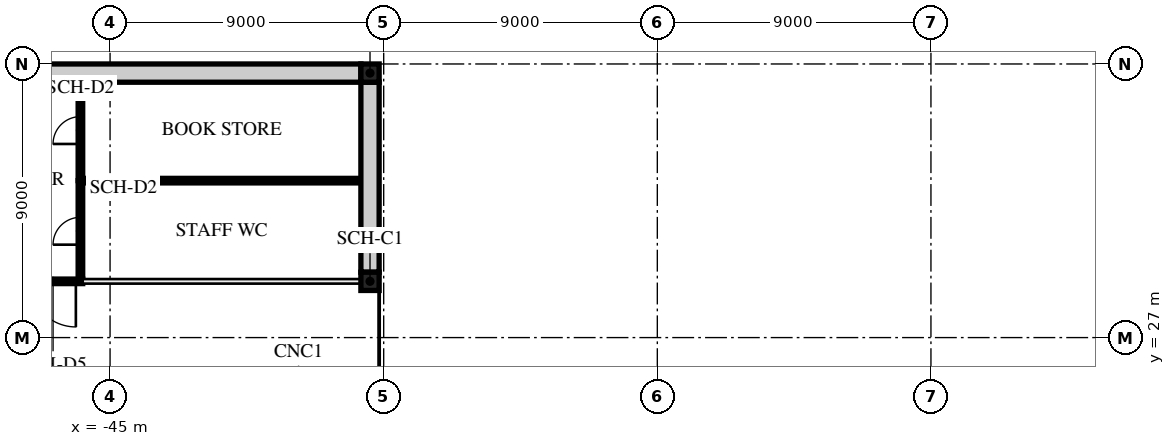
"""IFC4 building model, lengths in metres.
Left out: names, types, materials, properties, quantities, classifications, styles, units other than length and angle.
Written with IfcOpenShell. Run it as: python <this file> out.ifc"""

import sys

from ifc_helpers import new_model, si_unit, direction, frame, frame_2d, origin, origin_2d, place, context, subcontext, project, spatial, rectangle, extrude, element, fill, save


model = new_model("IFC4")
c1 = context("Model", 3, precision=1e-05, world=origin(), true_north=direction((0.0, 1.0)))
c2 = subcontext(c1, "Body", "Model", "MODEL_VIEW")
j1 = project(units=[si_unit("LENGTHUNIT", "METRE"), si_unit("PLANEANGLEUNIT", "RADIAN")], contexts=[c1])
p1 = place(None, origin())
s1 = spatial("IfcSite", under=j1, at=p1, CompositionType="ELEMENT")
p2 = place(p1, origin())
s2 = spatial("IfcBuilding", under=s1, at=p2, CompositionType="ELEMENT")
p3 = place(p2, origin())
s3 = spatial("IfcBuildingStorey", under=s2, at=p3, CompositionType="ELEMENT", Elevation=0.0)
p4 = place(p3, frame((-34.6, 27.0, 0.0), z_axis=(0.0, 0.0, 1.0), x_axis=(1.0, 0.0, 0.0)))
e1 = element("IfcColumn", 1, at=p4, inside=s3, PredefinedType="COLUMN", context=c2, shape_type="SweptSolid", body=[
    extrude(rectangle(XDim=0.7, YDim=0.7, at=origin_2d()), origin(), (0.0, 0.0, 1.0), 4.5),
])
p5 = place(p3, frame((-27.0, 27.0, 0.0), z_axis=(0.0, 0.0, 1.0), x_axis=(1.0, 0.0, 0.0)))
e2 = element("IfcColumn", 2, at=p5, inside=s3, PredefinedType="COLUMN", context=c2, shape_type="SweptSolid", body=[
    extrude(rectangle(XDim=0.875, YDim=0.875, at=origin_2d()), origin(), (0.0, 0.0, 1.0), 4.5),
])
p6 = place(p3, frame((-27.0, 34.6, 0.0), z_axis=(0.0, 0.0, 1.0), x_axis=(1.0, 0.0, 0.0)))
e3 = element("IfcColumn", 3, at=p6, inside=s3, PredefinedType="COLUMN", context=c2, shape_type="SweptSolid", body=[
    extrude(rectangle(XDim=0.55, YDim=0.55, at=origin_2d()), origin(), (0.0, 0.0, 1.0), 4.5),
])
p7 = place(p3, frame((-18.0, 34.6, 0.0), z_axis=(0.0, 0.0, 1.0), x_axis=(1.0, 0.0, 0.0)))
e4 = element("IfcColumn", 4, at=p7, inside=s3, PredefinedType="COLUMN", context=c2, shape_type="SweptSolid", body=[
    extrude(rectangle(XDim=0.625, YDim=0.625, at=origin_2d()), origin(), (0.0, 0.0, 1.0), 4.5),
])
p8 = place(p3, frame((-17.307, 25.412, 0.0), z_axis=(0.0, 0.0, 1.0), x_axis=(0.991001197216, 0.133853005627, 0.0)))
e5 = element("IfcColumn", 5, at=p8, inside=s3, PredefinedType="COLUMN", context=c2, shape_type="SweptSolid", body=[
    extrude(rectangle(XDim=1.575, YDim=1.575, at=origin_2d()), origin(), (0.0, 0.0, 1.0), 4.5),
])
p9 = place(p3, frame((-36.0, 27.0, 0.0), z_axis=(0.0, 0.0, 1.0), x_axis=(1.0, 0.0, 0.0)))
e6 = element("IfcWall", 6, at=p9, inside=s3, PredefinedType="PARTITIONING", context=c2, shape_type="SweptSolid", body=[
    extrude(rectangle(XDim=0.9, YDim=0.1, at=frame_2d((0.45, 0.0))), origin(), (0.0, 0.0, 1.0), 4.1),
])
p10 = place(p3, frame((-34.1, 27.0, 0.0), z_axis=(0.0, 0.0, 1.0), x_axis=(1.0, 0.0, 0.0)))
e7 = element("IfcWall", 7, at=p10, inside=s3, PredefinedType="PARTITIONING", context=c2, shape_type="SweptSolid", body=[
    extrude(rectangle(XDim=6.6, YDim=0.1, at=frame_2d((3.3, 0.0))), origin(), (0.0, 0.0, 1.0), 4.1),
])
p11 = place(p10, frame((1.7, 0.0, 0.0)))
e8 = element("IfcOpeningElement", 8, at=p11, cuts=e7, PredefinedType="OPENING", context=c2, shape_type="SweptSolid", body=[
    extrude(rectangle(XDim=1.8, YDim=2.1, at=frame_2d((0.9, 1.05))), frame((0.0, 0.06, 0.0), z_axis=(0.0, -1.0, 0.0), x_axis=(1.0, 0.0, 0.0)), (0.0, 0.0, 1.0), 0.12),
])
p12 = place(p3, frame((-18.075, 27.0, 0.0), z_axis=(0.0, 0.0, 1.0), x_axis=(1.0, 0.0, 0.0)))
e9 = element("IfcWall", 9, at=p12, inside=s3, PredefinedType="PARTITIONING", context=c2, shape_type="SweptSolid", body=[
    extrude(rectangle(XDim=4.625, YDim=0.1, at=frame_2d((2.312, 0.0))), origin(), (0.0, 0.0, 1.0), 4.1),
])
p13 = place(p3, frame((-27.075, 31.5, 0.0), z_axis=(0.0, 0.0, 1.0), x_axis=(1.0, 0.0, 0.0)))
e10 = element("IfcWall", 10, at=p13, inside=s3, PredefinedType="PARTITIONING", context=c2, shape_type="SweptSolid", body=[
    extrude(rectangle(XDim=9.15, YDim=0.2, at=frame_2d((4.575, 0.0))), origin(), (0.0, 0.0, 1.0), 4.1),
])
p14 = place(p13, frame((0.875, 0.0, 0.0)))
e11 = element("IfcOpeningElement", 11, at=p14, cuts=e10, PredefinedType="OPENING", context=c2, shape_type="SweptSolid", body=[
    extrude(rectangle(XDim=1.2, YDim=2.1, at=frame_2d((0.6, 1.05))), frame((0.0, 0.11, 0.0), z_axis=(0.0, -1.0, 0.0), x_axis=(1.0, 0.0, 0.0)), (0.0, 0.0, 1.0), 0.22),
])
p15 = place(p3, frame((-27.0, 27.5, 0.0), z_axis=(0.0, 0.0, 1.0), x_axis=(0.0, 1.0, 0.0)))
e12 = element("IfcWall", 12, at=p15, inside=s3, PredefinedType="PARTITIONING", context=c2, shape_type="SweptSolid", body=[
    extrude(rectangle(XDim=3.9, YDim=0.15, at=frame_2d((1.95, 0.0))), origin(), (0.0, 0.0, 1.0), 4.1),
])
p16 = place(p3, frame((-27.0, 31.6, 0.0), z_axis=(0.0, 0.0, 1.0), x_axis=(0.0, 1.0, 0.0)))
e13 = element("IfcWall", 13, at=p16, inside=s3, PredefinedType="PARTITIONING", context=c2, shape_type="SweptSolid", body=[
    extrude(rectangle(XDim=2.725, YDim=0.2, at=frame_2d((1.362, 0.0))), origin(), (0.0, 0.0, 1.0), 4.1),
])
p17 = place(p3, frame((-27.0, 34.875, 0.0), z_axis=(0.0, 0.0, 1.0), x_axis=(0.0, 1.0, 0.0)))
e14 = element("IfcWall", 14, at=p17, inside=s3, PredefinedType="PARTITIONING", context=c2, shape_type="SweptSolid", body=[
    extrude(rectangle(XDim=1.125, YDim=0.2, at=frame_2d((0.562, 0.0))), origin(), (0.0, 0.0, 1.0), 4.1),
])
p18 = place(p3, frame((-18.0, 27.05, 0.0), z_axis=(0.0, 0.0, 1.0), x_axis=(0.0, 1.0, 0.0)))
e15 = element("IfcWall", 15, at=p18, inside=s3, PredefinedType="PARTITIONING", context=c2, shape_type="SweptSolid", body=[
    extrude(rectangle(XDim=4.35, YDim=0.15, at=frame_2d((2.175, 0.0))), origin(), (0.0, 0.0, 1.0), 4.1),
])
p19 = place(p3, frame((-18.0, 31.6, 0.0), z_axis=(0.0, 0.0, 1.0), x_axis=(0.0, 1.0, 0.0)))
e16 = element("IfcWall", 16, at=p19, inside=s3, PredefinedType="PARTITIONING", context=c2, shape_type="SweptSolid", body=[
    extrude(rectangle(XDim=2.688, YDim=0.2, at=frame_2d((1.344, 0.0))), origin(), (0.0, 0.0, 1.0), 4.1),
])
p20 = place(p3, frame((-18.0, 34.913, 0.0), z_axis=(0.0, 0.0, 1.0), x_axis=(0.0, 1.0, 0.0)))
e17 = element("IfcWall", 17, at=p20, inside=s3, PredefinedType="PARTITIONING", context=c2, shape_type="SweptSolid", body=[
    extrude(rectangle(XDim=1.087, YDim=0.2, at=frame_2d((0.544, 0.0))), origin(), (0.0, 0.0, 1.0), 4.1),
])
p21 = place(p3, frame((-13.5, 27.05, 0.0), z_axis=(0.0, 0.0, 1.0), x_axis=(0.0, 1.0, 0.0)))
e18 = element("IfcWall", 18, at=p21, inside=s3, PredefinedType="PARTITIONING", context=c2, shape_type="SweptSolid", body=[
    extrude(rectangle(XDim=8.95, YDim=0.1, at=frame_2d((4.475, 0.0))), origin(), (0.0, 0.0, 1.0), 4.1),
])
p22 = place(p21, frame((3.55, 0.0, 0.0)))
e19 = element("IfcOpeningElement", 19, at=p22, cuts=e18, PredefinedType="OPENING", context=c2, shape_type="SweptSolid", body=[
    extrude(rectangle(XDim=1.8, YDim=2.1, at=frame_2d((0.9, 1.05))), frame((0.0, 0.06, 0.0), z_axis=(0.0, -1.0, 0.0), x_axis=(1.0, 0.0, 0.0)), (0.0, 0.0, 1.0), 0.12),
])
for number, where, z_axis, x_axis in (
    (20, (-36.45, 28.85, -0.2), (0.0, 0.0, 1.0), (1.0, 0.0, 0.0)),
    (21, (-36.45, 35.7, -0.2), (0.0, 0.0, 1.0), (1.0, 0.0, 0.0)),
):
    element("IfcColumn", number, at=place(p3, frame(where, z_axis=z_axis, x_axis=x_axis)), inside=s3, PredefinedType="COLUMN", context=c2, shape_type="SweptSolid", body=[
        extrude(rectangle(XDim=0.6, YDim=0.6, at=origin_2d()), origin(), (0.0, 0.0, 1.0), 4.7),
    ])
p23 = place(p3, frame((-45.9, 32.163, 0.0), z_axis=(0.0, 0.0, 1.0), x_axis=(1.0, 0.0, 0.0)))
e22 = element("IfcWall", 22, at=p23, inside=s3, PredefinedType="PARTITIONING", context=c2, shape_type="SweptSolid", body=[
    extrude(rectangle(XDim=9.15, YDim=0.15, at=frame_2d((4.575, 0.0))), origin(), (0.0, 0.0, 1.0), 4.1),
])
p24 = place(p3, frame((-45.975, 28.925, 0.0), z_axis=(0.0, 0.0, 1.0), x_axis=(0.0, 1.0, 0.0)))
e23 = element("IfcWall", 23, at=p24, inside=s3, PredefinedType="PARTITIONING", context=c2, shape_type="SweptSolid", body=[
    extrude(rectangle(XDim=3.238, YDim=0.15, at=frame_2d((1.619, 0.0))), origin(), (0.0, 0.0, 1.0), 4.1),
])
p25 = place(p24, frame((1.131, 0.0, 0.0)))
e24 = element("IfcOpeningElement", 24, at=p25, cuts=e23, PredefinedType="OPENING", context=c2, shape_type="SweptSolid", body=[
    extrude(rectangle(XDim=0.9, YDim=2.1, at=frame_2d((0.45, 1.05))), frame((0.0, 0.085, 0.0), z_axis=(0.0, -1.0, 0.0), x_axis=(1.0, 0.0, 0.0)), (0.0, 0.0, 1.0), 0.17),
])
p26 = place(p3, frame((-45.975, 32.163, 0.0), z_axis=(0.0, 0.0, 1.0), x_axis=(0.0, 1.0, 0.0)))
e25 = element("IfcWall", 25, at=p26, inside=s3, PredefinedType="PARTITIONING", context=c2, shape_type="SweptSolid", body=[
    extrude(rectangle(XDim=3.237, YDim=0.15, at=frame_2d((1.619, 0.0))), origin(), (0.0, 0.0, 1.0), 4.1),
])
p27 = place(p26, frame((1.206, 0.0, 0.0)))
e26 = element("IfcOpeningElement", 26, at=p27, cuts=e25, PredefinedType="OPENING", context=c2, shape_type="SweptSolid", body=[
    extrude(rectangle(XDim=0.9, YDim=2.1, at=frame_2d((0.45, 1.05))), frame((0.0, 0.085, 0.0), z_axis=(0.0, -1.0, 0.0), x_axis=(1.0, 0.0, 0.0)), (0.0, 0.0, 1.0), 0.17),
])
p28 = place(p3, frame((-47.85, 35.7, -0.2), z_axis=(0.0, 0.0, 1.0), x_axis=(1.0, 0.0, 0.0)))
e27 = element("IfcWall", 27, at=p28, inside=s3, PredefinedType="STANDARD", context=c2, shape_type="SweptSolid", body=[
    extrude(rectangle(XDim=11.1, YDim=0.6, at=frame_2d((5.55, 0.0))), origin(), (0.0, 0.0, 1.0), 4.3),
])
p29 = place(p3, frame((-36.45, 35.4, -0.2), z_axis=(0.0, 0.0, 1.0), x_axis=(0.0, -1.0, 0.0)))
e28 = element("IfcWall", 28, at=p29, inside=s3, PredefinedType="STANDARD", context=c2, shape_type="SweptSolid", body=[
    extrude(rectangle(XDim=6.25, YDim=0.6, at=frame_2d((3.125, 0.0))), origin(), (0.0, 0.0, 1.0), 4.3),
])
p30 = place(p3, frame((-45.9, 28.85, 0.0), z_axis=(0.0, 0.0, 1.0), x_axis=(-1.0, 0.0, 0.0)))
e29 = element("IfcWall", 29, at=p30, inside=s3, PredefinedType="PARTITIONING", context=c2, shape_type="SweptSolid", body=[
    extrude(rectangle(XDim=1.95, YDim=0.15, at=frame_2d((0.975, 0.0))), origin(), (0.0, 0.0, 1.0), 4.1),
])
p31 = place(p30, frame((0.225, 0.0, 0.0)))
e30 = element("IfcOpeningElement", 30, at=p31, cuts=e29, PredefinedType="OPENING", context=c2, shape_type="SweptSolid", body=[
    extrude(rectangle(XDim=1.5, YDim=2.4, at=frame_2d((0.75, 1.2))), frame((0.0, 0.085, 0.0), z_axis=(0.0, -1.0, 0.0), x_axis=(1.0, 0.0, 0.0)), (0.0, 0.0, 1.0), 0.17),
])
p32 = place(p3, frame((24.5, 35.7, 0.0), z_axis=(0.0, 0.0, 1.0), x_axis=(-1.0, 0.0, 0.0)))
e31 = element("IfcWall", 31, at=p32, inside=s3, PredefinedType="STANDARD", context=c2, shape_type="SweptSolid", body=[
    extrude(rectangle(XDim=49.0, YDim=0.6, at=frame_2d((24.5, 0.0))), origin(), (0.0, 0.0, 1.0), 4.1),
])
p33 = place(p32, frame((3.571, 0.0, 0.45)))
e32 = element("IfcOpeningElement", 32, at=p33, cuts=e31, PredefinedType="OPENING", context=c2, shape_type="SweptSolid", body=[
    extrude(rectangle(XDim=2.0, YDim=3.2, at=frame_2d((1.0, 1.6))), frame((0.0, 0.31, 0.0), z_axis=(0.0, -1.0, 0.0), x_axis=(1.0, 0.0, 0.0)), (0.0, 0.0, 1.0), 0.62),
])
p34 = place(p32, frame((8.0, 0.0, 0.45)))
e33 = element("IfcOpeningElement", 33, at=p34, cuts=e31, PredefinedType="OPENING", context=c2, shape_type="SweptSolid", body=[
    extrude(rectangle(XDim=2.0, YDim=3.2, at=frame_2d((1.0, 1.6))), frame((0.0, 0.31, 0.0), z_axis=(0.0, -1.0, 0.0), x_axis=(1.0, 0.0, 0.0)), (0.0, 0.0, 1.0), 0.62),
])
p35 = place(p32, frame((12.429, 0.0, 0.45)))
e34 = element("IfcOpeningElement", 34, at=p35, cuts=e31, PredefinedType="OPENING", context=c2, shape_type="SweptSolid", body=[
    extrude(rectangle(XDim=2.0, YDim=3.2, at=frame_2d((1.0, 1.6))), frame((0.0, 0.31, 0.0), z_axis=(0.0, -1.0, 0.0), x_axis=(1.0, 0.0, 0.0)), (0.0, 0.0, 1.0), 0.62),
])
p36 = place(p32, frame((16.857, 0.0, 0.45)))
e35 = element("IfcOpeningElement", 35, at=p36, cuts=e31, PredefinedType="OPENING", context=c2, shape_type="SweptSolid", body=[
    extrude(rectangle(XDim=2.0, YDim=3.2, at=frame_2d((1.0, 1.6))), frame((0.0, 0.31, 0.0), z_axis=(0.0, -1.0, 0.0), x_axis=(1.0, 0.0, 0.0)), (0.0, 0.0, 1.0), 0.62),
])
p37 = place(p32, frame((21.286, 0.0, 0.45)))
e36 = element("IfcOpeningElement", 36, at=p37, cuts=e31, PredefinedType="OPENING", context=c2, shape_type="SweptSolid", body=[
    extrude(rectangle(XDim=2.0, YDim=3.2, at=frame_2d((1.0, 1.6))), frame((0.0, 0.31, 0.0), z_axis=(0.0, -1.0, 0.0), x_axis=(1.0, 0.0, 0.0)), (0.0, 0.0, 1.0), 0.62),
])
p38 = place(p32, frame((25.714, 0.0, 0.45)))
e37 = element("IfcOpeningElement", 37, at=p38, cuts=e31, PredefinedType="OPENING", context=c2, shape_type="SweptSolid", body=[
    extrude(rectangle(XDim=2.0, YDim=3.2, at=frame_2d((1.0, 1.6))), frame((0.0, 0.31, 0.0), z_axis=(0.0, -1.0, 0.0), x_axis=(1.0, 0.0, 0.0)), (0.0, 0.0, 1.0), 0.62),
])
p39 = place(p32, frame((30.143, 0.0, 0.45)))
e38 = element("IfcOpeningElement", 38, at=p39, cuts=e31, PredefinedType="OPENING", context=c2, shape_type="SweptSolid", body=[
    extrude(rectangle(XDim=2.0, YDim=3.2, at=frame_2d((1.0, 1.6))), frame((0.0, 0.31, 0.0), z_axis=(0.0, -1.0, 0.0), x_axis=(1.0, 0.0, 0.0)), (0.0, 0.0, 1.0), 0.62),
])
p40 = place(p32, frame((34.571, 0.0, 0.45)))
e39 = element("IfcOpeningElement", 39, at=p40, cuts=e31, PredefinedType="OPENING", context=c2, shape_type="SweptSolid", body=[
    extrude(rectangle(XDim=2.0, YDim=3.2, at=frame_2d((1.0, 1.6))), frame((0.0, 0.31, 0.0), z_axis=(0.0, -1.0, 0.0), x_axis=(1.0, 0.0, 0.0)), (0.0, 0.0, 1.0), 0.62),
])
p41 = place(p32, frame((39.0, 0.0, 0.45)))
e40 = element("IfcOpeningElement", 40, at=p41, cuts=e31, PredefinedType="OPENING", context=c2, shape_type="SweptSolid", body=[
    extrude(rectangle(XDim=2.0, YDim=3.2, at=frame_2d((1.0, 1.6))), frame((0.0, 0.31, 0.0), z_axis=(0.0, -1.0, 0.0), x_axis=(1.0, 0.0, 0.0)), (0.0, 0.0, 1.0), 0.62),
])
p42 = place(p32, frame((43.429, 0.0, 0.45)))
e41 = element("IfcOpeningElement", 41, at=p42, cuts=e31, PredefinedType="OPENING", context=c2, shape_type="SweptSolid", body=[
    extrude(rectangle(XDim=2.0, YDim=3.2, at=frame_2d((1.0, 1.6))), frame((0.0, 0.31, 0.0), z_axis=(0.0, -1.0, 0.0), x_axis=(1.0, 0.0, 0.0)), (0.0, 0.0, 1.0), 0.62),
])
p43 = place(p3, frame((-26.7, 35.7, 0.0), z_axis=(0.0, 0.0, 1.0), x_axis=(1.0, 0.0, 0.0)))
e42 = element("IfcWall", 42, at=p43, inside=s3, PredefinedType="STANDARD", context=c2, shape_type="SweptSolid", body=[
    extrude(rectangle(XDim=2.2, YDim=0.6, at=frame_2d((1.1, 0.0))), origin(), (0.0, 0.0, 1.0), 4.1),
])
p44 = place(p43, frame((0.5, 0.0, 0.0)))
e43 = element("IfcOpeningElement", 43, at=p44, cuts=e42, PredefinedType="OPENING", context=c2, shape_type="SweptSolid", body=[
    extrude(rectangle(XDim=1.2, YDim=2.4, at=frame_2d((0.6, 1.2))), frame((0.0, 0.31, 0.0), z_axis=(0.0, -1.0, 0.0), x_axis=(1.0, 0.0, 0.0)), (0.0, 0.0, 1.0), 0.62),
])
p45 = place(p3, frame((-26.7, 35.7, 0.0), z_axis=(0.0, 0.0, 1.0), x_axis=(-1.0, 0.0, 0.0)))
e44 = element("IfcWall", 44, at=p45, inside=s3, PredefinedType="STANDARD", context=c2, shape_type="SweptSolid", body=[
    extrude(rectangle(XDim=4.176, YDim=0.6, at=frame_2d((2.088, 0.0))), origin(), (0.0, 0.0, 1.0), 4.1),
])
p46 = place(p45, frame((1.024, 0.0, 0.45)))
e45 = element("IfcOpeningElement", 45, at=p46, cuts=e44, PredefinedType="OPENING", context=c2, shape_type="SweptSolid", body=[
    extrude(rectangle(XDim=2.0, YDim=3.2, at=frame_2d((1.0, 1.6))), frame((0.0, 0.31, 0.0), z_axis=(0.0, -1.0, 0.0), x_axis=(1.0, 0.0, 0.0)), (0.0, 0.0, 1.0), 0.62),
])
p47 = place(p3, frame((-30.876, 35.7, 0.0), z_axis=(0.0, 0.0, 1.0), x_axis=(-0.707106781187, -0.707106781187, 0.0)))
e46 = element("IfcWall", 46, at=p47, inside=s3, PredefinedType="STANDARD", context=c2, shape_type="SweptSolid", body=[
    extrude(rectangle(XDim=6.823, YDim=0.6, at=frame_2d((3.411, 0.0))), origin(), (0.0, 0.0, 1.0), 4.1),
])
p48 = place(p3, frame((-35.7, 30.876, 0.0), z_axis=(0.0, 0.0, 1.0), x_axis=(0.0, -1.0, 0.0)))
e47 = element("IfcWall", 47, at=p48, inside=s3, PredefinedType="STANDARD", context=c2, shape_type="SweptSolid", body=[
    extrude(rectangle(XDim=3.876, YDim=0.6, at=frame_2d((1.938, 0.0))), origin(), (0.0, 0.0, 1.0), 4.1),
])
p49 = place(p14, frame((1.2, 0.0, 0.0), z_axis=(0.0, 0.0, 1.0), x_axis=(-1.0, 0.0, 0.0)))
e48 = element("IfcDoor", 48, at=p49, inside=s3, OperationType="SINGLE_SWING_LEFT", PredefinedType="DOOR", context=c2, shape_type="SweptSolid", body=[
    extrude(rectangle(XDim=1.2, YDim=2.1, at=frame_2d((0.6, 1.05))), frame((0.0, 0.025, 0.0), z_axis=(0.0, -1.0, 0.0), x_axis=(1.0, 0.0, 0.0)), (0.0, 0.0, 1.0), 0.05),
])
fill(e11, e48)
p50 = place(p11, origin())
e49 = element("IfcDoor", 49, at=p50, inside=s3, OperationType="DOUBLE_DOOR_SINGLE_SWING", PredefinedType="DOOR", context=c2, shape_type="SweptSolid", body=[
    extrude(rectangle(XDim=1.8, YDim=2.1, at=frame_2d((0.9, 1.05))), frame((0.0, 0.025, 0.0), z_axis=(0.0, -1.0, 0.0), x_axis=(1.0, 0.0, 0.0)), (0.0, 0.0, 1.0), 0.05),
])
fill(e8, e49)
p51 = place(p22, origin())
e50 = element("IfcDoor", 50, at=p51, inside=s3, OperationType="DOUBLE_DOOR_SINGLE_SWING", PredefinedType="DOOR", context=c2, shape_type="SweptSolid", body=[
    extrude(rectangle(XDim=1.8, YDim=2.1, at=frame_2d((0.9, 1.05))), frame((0.0, 0.025, 0.0), z_axis=(0.0, -1.0, 0.0), x_axis=(1.0, 0.0, 0.0)), (0.0, 0.0, 1.0), 0.05),
])
fill(e19, e50)
p52 = place(p25, origin())
e51 = element("IfcDoor", 51, at=p52, inside=s3, OperationType="SINGLE_SWING_RIGHT", PredefinedType="DOOR", context=c2, shape_type="SweptSolid", body=[
    extrude(rectangle(XDim=0.9, YDim=2.1, at=frame_2d((0.45, 1.05))), frame((0.0, 0.025, 0.0), z_axis=(0.0, -1.0, 0.0), x_axis=(1.0, 0.0, 0.0)), (0.0, 0.0, 1.0), 0.05),
])
fill(e24, e51)
p53 = place(p27, origin())
e52 = element("IfcDoor", 52, at=p53, inside=s3, OperationType="SINGLE_SWING_LEFT", PredefinedType="DOOR", context=c2, shape_type="SweptSolid", body=[
    extrude(rectangle(XDim=0.9, YDim=2.1, at=frame_2d((0.45, 1.05))), frame((0.0, 0.025, 0.0), z_axis=(0.0, -1.0, 0.0), x_axis=(1.0, 0.0, 0.0)), (0.0, 0.0, 1.0), 0.05),
])
fill(e26, e52)
p54 = place(p31, origin())
e53 = element("IfcDoor", 53, at=p54, inside=s3, OperationType="DOUBLE_DOOR_SINGLE_SWING", PredefinedType="DOOR", context=c2, shape_type="SweptSolid", body=[
    extrude(rectangle(XDim=1.5, YDim=2.4, at=frame_2d((0.75, 1.2))), frame((0.0, 0.025, 0.0), z_axis=(0.0, -1.0, 0.0), x_axis=(1.0, 0.0, 0.0)), (0.0, 0.0, 1.0), 0.05),
])
fill(e30, e53)
p55 = place(p41, origin())
e54 = element("IfcWindow", 54, at=p55, inside=s3, PartitioningType="SINGLE_PANEL", PredefinedType="WINDOW", context=c2, shape_type="SweptSolid", body=[
    extrude(rectangle(XDim=2.0, YDim=3.2, at=frame_2d((1.0, 1.6))), frame((0.0, 0.03, 0.0), z_axis=(0.0, -1.0, 0.0), x_axis=(1.0, 0.0, 0.0)), (0.0, 0.0, 1.0), 0.06),
])
fill(e40, e54)
p56 = place(p42, origin())
e55 = element("IfcWindow", 55, at=p56, inside=s3, PartitioningType="SINGLE_PANEL", PredefinedType="WINDOW", context=c2, shape_type="SweptSolid", body=[
    extrude(rectangle(XDim=2.0, YDim=3.2, at=frame_2d((1.0, 1.6))), frame((0.0, 0.03, 0.0), z_axis=(0.0, -1.0, 0.0), x_axis=(1.0, 0.0, 0.0)), (0.0, 0.0, 1.0), 0.06),
])
fill(e41, e55)
p57 = place(p44, origin())
e56 = element("IfcDoor", 56, at=p57, inside=s3, OperationType="SINGLE_SWING_LEFT", PredefinedType="DOOR", context=c2, shape_type="SweptSolid", body=[
    extrude(rectangle(XDim=1.2, YDim=2.4, at=frame_2d((0.6, 1.2))), frame((0.0, 0.025, 0.0), z_axis=(0.0, -1.0, 0.0), x_axis=(1.0, 0.0, 0.0)), (0.0, 0.0, 1.0), 0.05),
])
fill(e43, e56)
p58 = place(p46, origin())
e57 = element("IfcWindow", 57, at=p58, inside=s3, PartitioningType="SINGLE_PANEL", PredefinedType="WINDOW", context=c2, shape_type="SweptSolid", body=[
    extrude(rectangle(XDim=2.0, YDim=3.2, at=frame_2d((1.0, 1.6))), frame((0.0, 0.03, 0.0), z_axis=(0.0, -1.0, 0.0), x_axis=(1.0, 0.0, 0.0)), (0.0, 0.0, 1.0), 0.06),
])
fill(e45, e57)
save(model, sys.argv[1])
